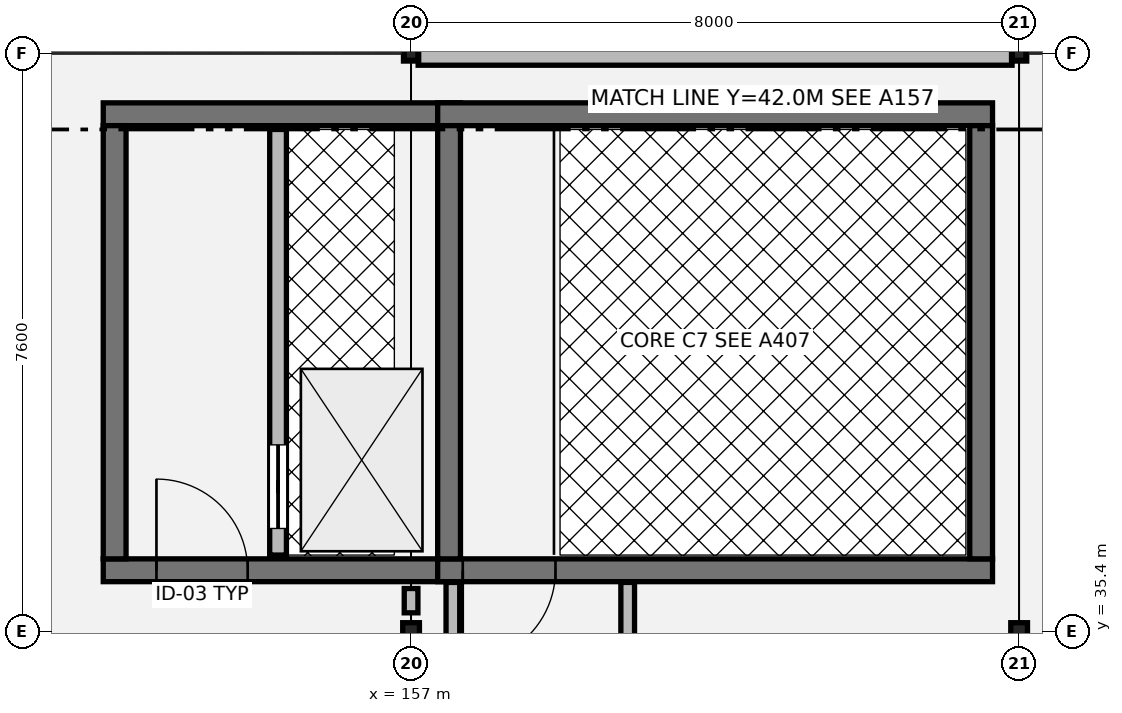
"""IFC4 building model, lengths in metres.
Left out: names, types, materials, properties, quantities, classifications, styles, units other than length and angle.
Written with IfcOpenShell. Run it as: python <this file> out.ifc"""

import sys

from ifc_helpers import new_model, si_unit, direction, frame, frame_2d, origin, origin_2d, place, context, subcontext, project, spatial, rectangle, hollow_rectangle, i_section, extrude, element, fill, save


model = new_model("IFC4")
c1 = context("Model", 3, precision=1e-05, world=origin(), true_north=direction((0.0, 1.0)))
c2 = subcontext(c1, "Body", "Model", "MODEL_VIEW")
j1 = project(units=[si_unit("LENGTHUNIT", "METRE"), si_unit("PLANEANGLEUNIT", "RADIAN")], contexts=[c1])
p1 = place(None, origin())
s1 = spatial("IfcSite", under=j1, at=p1, CompositionType="ELEMENT")
p2 = place(p1, origin())
s2 = spatial("IfcBuilding", under=s1, at=p2, CompositionType="ELEMENT")
p3 = place(p2, frame((0.0, 0.0, 17.34)))
s3 = spatial("IfcBuildingStorey", under=s2, at=p3, CompositionType="ELEMENT", Elevation=17.34)
p4 = place(p3, frame((157.0, 35.4, 0.0), z_axis=(0.0, 0.0, 1.0), x_axis=(1.0, 0.0, 0.0)))
e1 = element("IfcColumn", 1, at=p4, inside=s3, PredefinedType="COLUMN", context=c2, shape_type="SweptSolid", body=[
    extrude(i_section(OverallWidth=0.22, OverallDepth=0.22, WebThickness=0.01, FlangeThickness=0.016, at=origin_2d()), origin(), (0.0, 0.0, 1.0), 3.89),
])
p5 = place(p3, frame((157.0, 43.0, 0.0), z_axis=(0.0, 0.0, 1.0), x_axis=(1.0, 0.0, 0.0)))
e2 = element("IfcColumn", 2, at=p5, inside=s3, PredefinedType="COLUMN", context=c2, shape_type="SweptSolid", body=[
    extrude(hollow_rectangle(XDim=0.18, YDim=0.18, WallThickness=0.01, at=origin_2d()), origin(), (0.0, 0.0, 1.0), 3.89),
])
p6 = place(p3, frame((165.0, 35.4, 0.0), z_axis=(0.0, 0.0, 1.0), x_axis=(1.0, 0.0, 0.0)))
e3 = element("IfcColumn", 3, at=p6, inside=s3, PredefinedType="COLUMN", context=c2, shape_type="SweptSolid", body=[
    extrude(i_section(OverallWidth=0.22, OverallDepth=0.22, WebThickness=0.01, FlangeThickness=0.016, at=origin_2d()), origin(), (0.0, 0.0, 1.0), 3.89),
])
p7 = place(p3, frame((165.0, 43.0, 0.0), z_axis=(0.0, 0.0, 1.0), x_axis=(1.0, 0.0, 0.0)))
e4 = element("IfcColumn", 4, at=p7, inside=s3, PredefinedType="COLUMN", context=c2, shape_type="SweptSolid", body=[
    extrude(hollow_rectangle(XDim=0.18, YDim=0.18, WallThickness=0.01, at=origin_2d()), origin(), (0.0, 0.0, 1.0), 3.89),
])
p8 = place(p3, frame((164.907, 43.0, 0.0), z_axis=(0.0, 0.0, 1.0), x_axis=(-1.0, 0.0, 0.0)))
e5 = element("IfcWall", 5, at=p8, inside=s3, PredefinedType="SOLIDWALL", context=c2, shape_type="SweptSolid", body=[
    extrude(rectangle(XDim=7.814, YDim=0.31, at=frame_2d((3.907, 0.0))), origin(), (0.0, 0.0, 1.0), 3.48),
])
p9 = place(p3, frame((152.95, 36.2, 0.0), z_axis=(0.0, 0.0, 1.0), x_axis=(1.0, 0.0, 0.0)))
e6 = element("IfcWall", 6, at=p9, inside=s3, PredefinedType="SHEAR", context=c2, shape_type="SweptSolid", body=[
    extrude(rectangle(XDim=4.7, YDim=0.3, at=frame_2d((2.35, 0.0))), origin(), (0.0, 0.0, 1.0), 3.845),
])
p10 = place(p9, frame((0.7, 0.0, 0.0)))
e7 = element("IfcOpeningElement", 7, at=p10, cuts=e6, PredefinedType="OPENING", context=c2, shape_type="SweptSolid", body=[
    extrude(rectangle(XDim=1.2, YDim=2.16, at=frame_2d((0.6, 1.08))), frame((0.0, 0.16, 0.0), z_axis=(0.0, -1.0, 0.0), x_axis=(1.0, 0.0, 0.0)), (0.0, 0.0, 1.0), 0.32),
])
p11 = place(p3, frame((157.65, 42.2, 0.0), z_axis=(0.0, 0.0, 1.0), x_axis=(-1.0, 0.0, 0.0)))
e8 = element("IfcWall", 8, at=p11, inside=s3, PredefinedType="SHEAR", context=c2, shape_type="SweptSolid", body=[
    extrude(rectangle(XDim=4.7, YDim=0.3, at=frame_2d((2.35, 0.0))), origin(), (0.0, 0.0, 1.0), 3.845),
])
p12 = place(p3, frame((153.1, 42.05, 0.0), z_axis=(0.0, 0.0, 1.0), x_axis=(0.0, -1.0, 0.0)))
e9 = element("IfcWall", 9, at=p12, inside=s3, PredefinedType="SHEAR", context=c2, shape_type="SweptSolid", body=[
    extrude(rectangle(XDim=5.7, YDim=0.3, at=frame_2d((2.85, 0.0))), origin(), (0.0, 0.0, 1.0), 3.845),
])
p13 = place(p3, frame((155.25, 36.4, 0.0), z_axis=(0.0, 0.0, 1.0), x_axis=(0.0, 1.0, 0.0)))
e10 = element("IfcWall", 10, at=p13, inside=s3, PredefinedType="SOLIDWALL", context=c2, shape_type="SweptSolid", body=[
    extrude(rectangle(XDim=5.6, YDim=0.22, at=frame_2d((2.8, 0.0))), origin(), (0.0, 0.0, 1.0), 3.845),
])
p14 = place(p13, frame((0.35, 0.0, 0.0)))
e11 = element("IfcOpeningElement", 11, at=p14, cuts=e10, PredefinedType="OPENING", context=c2, shape_type="SweptSolid", body=[
    extrude(rectangle(XDim=1.1, YDim=2.15, at=frame_2d((0.55, 1.075))), frame((0.0, 0.12, 0.0), z_axis=(0.0, -1.0, 0.0), x_axis=(1.0, 0.0, 0.0)), (0.0, 0.0, 1.0), 0.24),
])
p15 = place(p3, frame((157.35, 36.2, 0.0), z_axis=(0.0, 0.0, 1.0), x_axis=(1.0, 0.0, 0.0)))
e12 = element("IfcWall", 12, at=p15, inside=s3, PredefinedType="SHEAR", context=c2, shape_type="SweptSolid", body=[
    extrude(rectangle(XDim=7.3, YDim=0.3, at=frame_2d((3.65, 0.0))), origin(), (0.0, 0.0, 1.0), 3.845),
])
p16 = place(p15, frame((0.33, 0.0, 0.0)))
e13 = element("IfcOpeningElement", 13, at=p16, cuts=e12, PredefinedType="OPENING", context=c2, shape_type="SweptSolid", body=[
    extrude(rectangle(XDim=1.22, YDim=2.18, at=frame_2d((0.61, 1.09))), frame((0.0, 0.16, 0.0), z_axis=(0.0, -1.0, 0.0), x_axis=(1.0, 0.0, 0.0)), (0.0, 0.0, 1.0), 0.32),
])
p17 = place(p3, frame((157.35, 42.2, 0.0), z_axis=(0.0, 0.0, 1.0), x_axis=(1.0, 0.0, 0.0)))
e14 = element("IfcWall", 14, at=p17, inside=s3, PredefinedType="SHEAR", context=c2, shape_type="SweptSolid", body=[
    extrude(rectangle(XDim=7.3, YDim=0.3, at=frame_2d((3.65, 0.0))), origin(), (0.0, 0.0, 1.0), 3.845),
])
for number, where, z_axis, x_axis in (
    (15, (157.5, 36.35, 0.0), (0.0, 0.0, 1.0), (0.0, 1.0, 0.0)),
    (16, (164.5, 36.35, 0.0), (0.0, 0.0, 1.0), (0.0, 1.0, 0.0)),
):
    element("IfcWall", number, at=place(p3, frame(where, z_axis=z_axis, x_axis=x_axis)), inside=s3, PredefinedType="SHEAR", context=c2, shape_type="SweptSolid", body=[
        extrude(rectangle(XDim=5.7, YDim=0.3, at=frame_2d((2.85, 0.0))), origin(), (0.0, 0.0, 1.0), 3.845),
    ])
p18 = place(p3, frame((157.0, 35.64, 0.0), z_axis=(0.0, 0.0, 1.0), x_axis=(0.0, 1.0, 0.0)))
e17 = element("IfcWall", 17, at=p18, inside=s3, PredefinedType="PARTITIONING", context=c2, shape_type="SweptSolid", body=[
    extrude(rectangle(XDim=0.32, YDim=0.18, at=frame_2d((0.16, 0.0))), origin(), (0.0, 0.0, 1.0), 3.18),
])
for number, where, z_axis, x_axis in (
    (18, (157.55, 11.96, 0.0), (0.0, 0.0, 1.0), (0.0, 1.0, 0.0)),
    (19, (159.85, 11.96, 0.0), (0.0, 0.0, 1.0), (0.0, 1.0, 0.0)),
):
    element("IfcWall", number, at=place(p3, frame(where, z_axis=z_axis, x_axis=x_axis)), inside=s3, PredefinedType="PARTITIONING", context=c2, shape_type="SweptSolid", body=[
        extrude(rectangle(XDim=24.08, YDim=0.18, at=frame_2d((12.04, 0.0))), origin(), (0.0, 0.0, 1.0), 3.18),
    ])
p19 = place(p10, origin())
e20 = element("IfcDoor", 20, at=p19, inside=s3, OperationType="SINGLE_SWING_LEFT", PredefinedType="DOOR", context=c2, shape_type="SweptSolid", body=[
    extrude(rectangle(XDim=1.2, YDim=2.16, at=frame_2d((0.6, 1.08))), frame((0.0, 0.025, 0.0), z_axis=(0.0, -1.0, 0.0), x_axis=(1.0, 0.0, 0.0)), (0.0, 0.0, 1.0), 0.05),
])
fill(e7, e20)
p20 = place(p14, origin())
e21 = element("IfcDoor", 21, at=p20, inside=s3, OperationType="SLIDING_TO_LEFT", PredefinedType="DOOR", context=c2, shape_type="SweptSolid", body=[
    extrude(rectangle(XDim=1.1, YDim=2.15, at=frame_2d((0.55, 1.075))), frame((0.0, 0.025, 0.0), z_axis=(0.0, -1.0, 0.0), x_axis=(1.0, 0.0, 0.0)), (0.0, 0.0, 1.0), 0.05),
])
fill(e11, e21)
p21 = place(p16, origin())
e22 = element("IfcDoor", 22, at=p21, inside=s3, OperationType="SINGLE_SWING_RIGHT", PredefinedType="DOOR", context=c2, shape_type="SweptSolid", body=[
    extrude(rectangle(XDim=1.22, YDim=2.18, at=frame_2d((0.61, 1.09))), frame((0.0, 0.025, 0.0), z_axis=(0.0, -1.0, 0.0), x_axis=(1.0, 0.0, 0.0)), (0.0, 0.0, 1.0), 0.05),
])
fill(e13, e22)
save(model, sys.argv[1])
